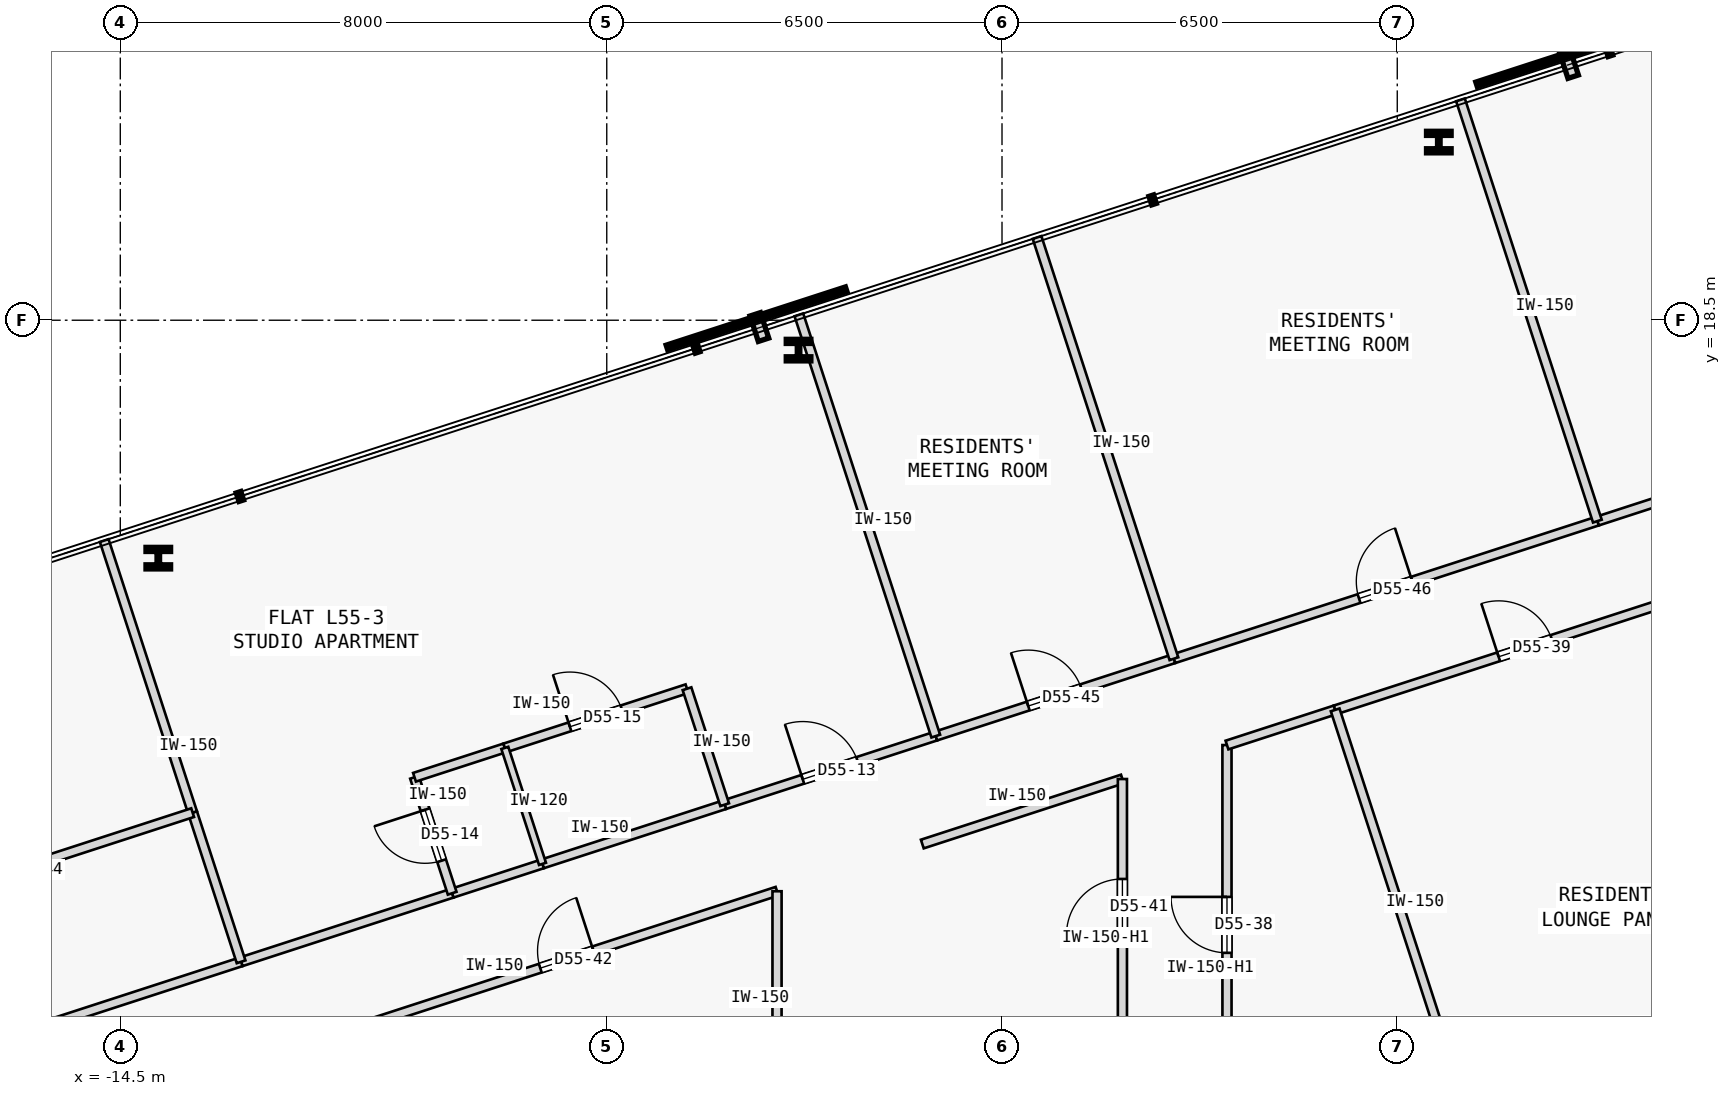
"""IFC4 building model, lengths in metres.
Left out: names, types, materials, properties, quantities, classifications, styles, units other than length and angle.
Written with IfcOpenShell. Run it as: python <this file> out.ifc"""

import sys

from ifc_helpers import new_model, si_unit, direction, frame, frame_2d, origin, origin_2d, place, context, subcontext, project, spatial, rectangle, i_section, extrude, element, fill, save


model = new_model("IFC4")
c1 = context("Model", 3, precision=1e-05, world=origin(), true_north=direction((0.0, 1.0)))
c2 = subcontext(c1, "Body", "Model", "MODEL_VIEW")
j1 = project(units=[si_unit("LENGTHUNIT", "METRE"), si_unit("PLANEANGLEUNIT", "RADIAN")], contexts=[c1])
p1 = place(None, origin())
s1 = spatial("IfcSite", under=j1, at=p1, CompositionType="ELEMENT")
p2 = place(p1, origin())
s2 = spatial("IfcBuilding", under=s1, at=p2, CompositionType="ELEMENT")
p3 = place(p2, frame((0.0, 0.0, 210.9)))
s3 = spatial("IfcBuildingStorey", under=s2, at=p3, CompositionType="ELEMENT", Elevation=210.9)
for number, where, z_axis, x_axis in (
    (1, (7.184, 21.43, 0.0), (0.0, 0.0, 1.0), (1.0, 0.0, 0.0)),
    (2, (-3.346, 18.009, 0.0), (0.0, 0.0, 1.0), (1.0, 0.0, 0.0)),
    (3, (-13.875, 14.587, 0.0), (0.0, 0.0, 1.0), (1.0, 0.0, 0.0)),
):
    element("IfcColumn", number, at=place(p3, frame(where, z_axis=z_axis, x_axis=x_axis)), inside=s3, PredefinedType="COLUMN", context=c2, shape_type="SweptSolid", body=[
        extrude(i_section(OverallWidth=0.405, OverallDepth=0.355, WebThickness=0.042, FlangeThickness=0.068, FilletRadius=0.015, at=origin_2d()), origin(), (0.0, 0.0, 1.0), 3.35),
    ])
p4 = place(p3, frame((-12.513, 7.949, 0.0), z_axis=(0.0, 0.0, 1.0), x_axis=(0.951050780541, 0.309034646652, 0.0)))
e4 = element("IfcWall", 4, at=p4, inside=s3, PredefinedType="PARTITIONING", context=c2, shape_type="SweptSolid", body=[
    extrude(rectangle(XDim=3.65, YDim=0.15, at=frame_2d((1.825, 0.0))), origin(), (0.0, 0.0, 1.0), 3.125),
])
p5 = place(p3, frame((-4.561, 10.533, 0.0), z_axis=(0.0, 0.0, 1.0), x_axis=(0.951057168147, 0.309014988174, 0.0)))
e5 = element("IfcWall", 5, at=p5, inside=s3, PredefinedType="PARTITIONING", context=c2, shape_type="SweptSolid", body=[
    extrude(rectangle(XDim=3.65, YDim=0.15, at=frame_2d((1.825, 0.0))), origin(), (0.0, 0.0, 1.0), 3.125),
])
p6 = place(p5, frame((1.35, 0.0, 0.0)))
e6 = element("IfcOpeningElement", 6, at=p6, cuts=e5, PredefinedType="OPENING", context=c2, shape_type="SweptSolid", body=[
    extrude(rectangle(XDim=0.95, YDim=2.15, at=frame_2d((0.475, 1.075))), frame((0.0, 0.085, 0.0), z_axis=(0.0, -1.0, 0.0), x_axis=(1.0, 0.0, 0.0)), (0.0, 0.0, 1.0), 0.17),
])
p7 = place(p3, frame((-9.042, 9.077, 0.0), z_axis=(0.0, 0.0, 1.0), x_axis=(0.951062779317, 0.308997718112, 0.0)))
e7 = element("IfcWall", 7, at=p7, inside=s3, PredefinedType="PARTITIONING", context=c2, shape_type="SweptSolid", body=[
    extrude(rectangle(XDim=1.562, YDim=0.15, at=frame_2d((0.781, 0.0))), origin(), (0.0, 0.0, 1.0), 3.125),
])
p8 = place(p3, frame((-7.557, 9.56, 0.0), z_axis=(0.0, 0.0, 1.0), x_axis=(0.951058557014, 0.309010713619, 0.0)))
e8 = element("IfcWall", 8, at=p8, inside=s3, PredefinedType="PARTITIONING", context=c2, shape_type="SweptSolid", body=[
    extrude(rectangle(XDim=3.15, YDim=0.15, at=frame_2d((1.575, 0.0))), origin(), (0.0, 0.0, 1.0), 3.125),
])
p9 = place(p3, frame((9.791, 15.196, 0.0), z_axis=(0.0, 0.0, 1.0), x_axis=(0.951050780541, 0.309034646652, 0.0)))
e9 = element("IfcWall", 9, at=p9, inside=s3, PredefinedType="PARTITIONING", context=c2, shape_type="SweptSolid", body=[
    extrude(rectangle(XDim=3.65, YDim=0.15, at=frame_2d((1.825, 0.0))), origin(), (0.0, 0.0, 1.0), 3.125),
])
p10 = place(p3, frame((3.7, 5.6, 0.0), z_axis=(0.0, 0.0, 1.0), x_axis=(-0.000123839008, 0.999999992332, 0.0)))
e10 = element("IfcWall", 10, at=p10, inside=s3, PredefinedType="PARTITIONING", context=c2, shape_type="SweptSolid", body=[
    extrude(rectangle(XDim=5.914, YDim=0.15, at=frame_2d((2.957, 0.0))), origin(), (0.0, 0.0, 1.0), 2.675),
])
p11 = place(p10, frame((2.497, 0.0, 0.0)))
e11 = element("IfcOpeningElement", 11, at=p11, cuts=e10, PredefinedType="OPENING", context=c2, shape_type="SweptSolid", body=[
    extrude(rectangle(XDim=0.92, YDim=2.15, at=frame_2d((0.46, 1.075))), frame((0.0, 0.085, 0.0), z_axis=(0.0, -1.0, 0.0), x_axis=(1.0, 0.0, 0.0)), (0.0, 0.0, 1.0), 0.17),
])
p12 = place(p3, frame((3.699, 11.514, 0.0), z_axis=(0.0, 0.0, 1.0), x_axis=(0.951069540665, 0.308976906612, 0.0)))
e12 = element("IfcWall", 12, at=p12, inside=s3, PredefinedType="PARTITIONING", context=c2, shape_type="SweptSolid", body=[
    extrude(rectangle(XDim=1.871, YDim=0.15, at=frame_2d((0.936, 0.0))), origin(), (0.0, 0.0, 1.0), 3.125),
])
p13 = place(p3, frame((5.479, 12.092, 0.0), z_axis=(0.0, 0.0, 1.0), x_axis=(0.951051809397, 0.309031480343, 0.0)))
e13 = element("IfcWall", 13, at=p13, inside=s3, PredefinedType="PARTITIONING", context=c2, shape_type="SweptSolid", body=[
    extrude(rectangle(XDim=6.573, YDim=0.15, at=frame_2d((3.287, 0.0))), origin(), (0.0, 0.0, 1.0), 3.125),
])
p14 = place(p13, frame((2.826, 0.0, 0.0)))
e14 = element("IfcOpeningElement", 14, at=p14, cuts=e13, PredefinedType="OPENING", context=c2, shape_type="SweptSolid", body=[
    extrude(rectangle(XDim=0.92, YDim=2.15, at=frame_2d((0.46, 1.075))), frame((0.0, 0.085, 0.0), z_axis=(0.0, -1.0, 0.0), x_axis=(1.0, 0.0, 0.0)), (0.0, 0.0, 1.0), 0.17),
])
p15 = place(p3, frame((-1.311, 9.886, 0.0), z_axis=(0.0, 0.0, 1.0), x_axis=(0.951068803905, 0.308979174442, 0.0)))
e15 = element("IfcWall", 15, at=p15, inside=s3, PredefinedType="PARTITIONING", context=c2, shape_type="SweptSolid", body=[
    extrude(rectangle(XDim=3.46, YDim=0.15, at=frame_2d((1.73, 0.0))), origin(), (0.0, 0.0, 1.0), 3.125),
])
p16 = place(p3, frame((1.98, 6.748, 0.0), z_axis=(0.0, 0.0, 1.0), x_axis=(0.0, 1.0, 0.0)))
e16 = element("IfcWall", 16, at=p16, inside=s3, PredefinedType="PARTITIONING", context=c2, shape_type="SweptSolid", body=[
    extrude(rectangle(XDim=4.207, YDim=0.15, at=frame_2d((2.104, 0.0))), origin(), (0.0, 0.0, 1.0), 2.675),
])
p17 = place(p16, frame((1.643, 0.0, 0.0)))
e17 = element("IfcOpeningElement", 17, at=p17, cuts=e16, PredefinedType="OPENING", context=c2, shape_type="SweptSolid", body=[
    extrude(rectangle(XDim=0.92, YDim=2.15, at=frame_2d((0.46, 1.075))), frame((0.0, 0.085, 0.0), z_axis=(0.0, -1.0, 0.0), x_axis=(1.0, 0.0, 0.0)), (0.0, 0.0, 1.0), 0.17),
])
p18 = place(p3, frame((-10.612, 6.864, 0.0), z_axis=(0.0, 0.0, 1.0), x_axis=(0.951060972078, 0.309003280548, 0.0)))
e18 = element("IfcWall", 18, at=p18, inside=s3, PredefinedType="PARTITIONING", context=c2, shape_type="SweptSolid", body=[
    extrude(rectangle(XDim=7.268, YDim=0.15, at=frame_2d((3.634, 0.0))), origin(), (0.0, 0.0, 1.0), 3.125),
])
p19 = place(p18, frame((3.174, 0.0, 0.0)))
e19 = element("IfcOpeningElement", 19, at=p19, cuts=e18, PredefinedType="OPENING", context=c2, shape_type="SweptSolid", body=[
    extrude(rectangle(XDim=0.92, YDim=2.15, at=frame_2d((0.46, 1.075))), frame((0.0, 0.085, 0.0), z_axis=(0.0, -1.0, 0.0), x_axis=(1.0, 0.0, 0.0)), (0.0, 0.0, 1.0), 0.17),
])
p20 = place(p3, frame((-3.7, 5.6, 0.0), z_axis=(0.0, 0.0, 1.0), x_axis=(0.000139120755, 0.999999990323, 0.0)))
e20 = element("IfcWall", 20, at=p20, inside=s3, PredefinedType="PARTITIONING", context=c2, shape_type="SweptSolid", body=[
    extrude(rectangle(XDim=3.51, YDim=0.15, at=frame_2d((1.755, 0.0))), origin(), (0.0, 0.0, 1.0), 3.125),
])
p21 = place(p3, frame((-18.292, 6.072, 0.0), z_axis=(0.0, 0.0, 1.0), x_axis=(0.951062707515, 0.30899793911, 0.0)))
e21 = element("IfcWall", 21, at=p21, inside=s3, PredefinedType="PARTITIONING", context=c2, shape_type="SweptSolid", body=[
    extrude(rectangle(XDim=6.076, YDim=0.15, at=frame_2d((3.038, 0.0))), origin(), (0.0, 0.0, 1.0), 3.125),
])
p22 = place(p21, frame((0.877, 0.0, 0.0)))
e22 = element("IfcOpeningElement", 22, at=p22, cuts=e21, PredefinedType="OPENING", context=c2, shape_type="SweptSolid", body=[
    extrude(rectangle(XDim=0.92, YDim=2.15, at=frame_2d((0.46, 1.075))), frame((0.0, 0.085, 0.0), z_axis=(0.0, -1.0, 0.0), x_axis=(1.0, 0.0, 0.0)), (0.0, 0.0, 1.0), 0.17),
])
p23 = place(p3, frame((-1.089, 11.661, 0.0), z_axis=(0.0, 0.0, 1.0), x_axis=(0.951057158344, 0.309015018346, 0.0)))
e23 = element("IfcWall", 23, at=p23, inside=s3, PredefinedType="PARTITIONING", context=c2, shape_type="SweptSolid", body=[
    extrude(rectangle(XDim=4.118, YDim=0.15, at=frame_2d((2.059, 0.0))), origin(), (0.0, 0.0, 1.0), 3.125),
])
p24 = place(p23, frame((1.599, 0.0, 0.0)))
e24 = element("IfcOpeningElement", 24, at=p24, cuts=e23, PredefinedType="OPENING", context=c2, shape_type="SweptSolid", body=[
    extrude(rectangle(XDim=0.92, YDim=2.15, at=frame_2d((0.46, 1.075))), frame((0.0, 0.085, 0.0), z_axis=(0.0, -1.0, 0.0), x_axis=(1.0, 0.0, 0.0)), (0.0, 0.0, 1.0), 0.17),
])
p25 = place(p3, frame((2.827, 12.934, 0.0), z_axis=(0.0, 0.0, 1.0), x_axis=(0.951056608557, 0.309016710423, 0.0)))
e25 = element("IfcWall", 25, at=p25, inside=s3, PredefinedType="PARTITIONING", context=c2, shape_type="SweptSolid", body=[
    extrude(rectangle(XDim=7.322, YDim=0.15, at=frame_2d((3.661, 0.0))), origin(), (0.0, 0.0, 1.0), 3.125),
])
p26 = place(p25, frame((3.201, 0.0, 0.0)))
e26 = element("IfcOpeningElement", 26, at=p26, cuts=e25, PredefinedType="OPENING", context=c2, shape_type="SweptSolid", body=[
    extrude(rectangle(XDim=0.92, YDim=2.15, at=frame_2d((0.46, 1.075))), frame((0.0, 0.085, 0.0), z_axis=(0.0, -1.0, 0.0), x_axis=(1.0, 0.0, 0.0)), (0.0, 0.0, 1.0), 0.17),
])
p27 = place(p3, frame((-9.042, 9.077, 0.0), z_axis=(0.0, 0.0, 1.0), x_axis=(-0.308912611775, 0.951090425925, 0.0)))
e27 = element("IfcWall", 27, at=p27, inside=s3, PredefinedType="PARTITIONING", context=c2, shape_type="SweptSolid", body=[
    extrude(rectangle(XDim=2.005, YDim=0.15, at=frame_2d((1.002, 0.0))), origin(), (0.0, 0.0, 1.0), 3.125),
])
p28 = place(p27, frame((0.562, 0.0, 0.0)))
e28 = element("IfcOpeningElement", 28, at=p28, cuts=e27, PredefinedType="OPENING", context=c2, shape_type="SweptSolid", body=[
    extrude(rectangle(XDim=0.88, YDim=2.15, at=frame_2d((0.44, 1.075))), frame((0.0, 0.085, 0.0), z_axis=(0.0, -1.0, 0.0), x_axis=(1.0, 0.0, 0.0)), (0.0, 0.0, 1.0), 0.17),
])
p29 = place(p3, frame((-9.662, 10.984, 0.0), z_axis=(0.0, 0.0, 1.0), x_axis=(0.951047852885, 0.309043656337, 0.0)))
e29 = element("IfcWall", 29, at=p29, inside=s3, PredefinedType="PARTITIONING", context=c2, shape_type="SweptSolid", body=[
    extrude(rectangle(XDim=1.562, YDim=0.15, at=frame_2d((0.781, 0.0))), origin(), (0.0, 0.0, 1.0), 3.125),
])
p30 = place(p3, frame((-8.176, 11.467, 0.0), z_axis=(0.0, 0.0, 1.0), x_axis=(0.951058557014, 0.309010713619, 0.0)))
e30 = element("IfcWall", 30, at=p30, inside=s3, PredefinedType="PARTITIONING", context=c2, shape_type="SweptSolid", body=[
    extrude(rectangle(XDim=3.15, YDim=0.15, at=frame_2d((1.575, 0.0))), origin(), (0.0, 0.0, 1.0), 3.125),
])
p31 = place(p30, frame((1.125, 0.0, 0.0)))
e31 = element("IfcOpeningElement", 31, at=p31, cuts=e30, PredefinedType="OPENING", context=c2, shape_type="SweptSolid", body=[
    extrude(rectangle(XDim=0.9, YDim=2.15, at=frame_2d((0.45, 1.075))), frame((0.0, 0.085, 0.0), z_axis=(0.0, -1.0, 0.0), x_axis=(1.0, 0.0, 0.0)), (0.0, 0.0, 1.0), 0.17),
])
p32 = place(p3, frame((-4.561, 10.533, 0.0), z_axis=(0.0, 0.0, 1.0), x_axis=(-0.309022749039, 0.951054646472, 0.0)))
e32 = element("IfcWall", 32, at=p32, inside=s3, PredefinedType="PARTITIONING", context=c2, shape_type="SweptSolid", body=[
    extrude(rectangle(XDim=2.005, YDim=0.15, at=frame_2d((1.002, 0.0))), origin(), (0.0, 0.0, 1.0), 3.125),
])
p33 = place(p3, frame((-12.513, 7.949, 0.0), z_axis=(0.0, 0.0, 1.0), x_axis=(-0.309062527822, 0.951041720376, 0.0)))
e33 = element("IfcWall", 33, at=p33, inside=s3, PredefinedType="PARTITIONING", context=c2, shape_type="SweptSolid", body=[
    extrude(rectangle(XDim=2.579, YDim=0.15, at=frame_2d((1.29, 0.0))), origin(), (0.0, 0.0, 1.0), 3.125),
])
p34 = place(p3, frame((-13.311, 10.402, 0.0), z_axis=(0.0, 0.0, 1.0), x_axis=(-0.309010977541, 0.951058471262, 0.0)))
e34 = element("IfcWall", 34, at=p34, inside=s3, PredefinedType="PARTITIONING", context=c2, shape_type="SweptSolid", body=[
    extrude(rectangle(XDim=4.705, YDim=0.15, at=frame_2d((2.353, 0.0))), origin(), (0.0, 0.0, 1.0), 3.125),
])
p35 = place(p3, frame((-1.089, 11.661, 0.0), z_axis=(0.0, 0.0, 1.0), x_axis=(-0.309029230739, 0.951052540372, 0.0)))
e35 = element("IfcWall", 35, at=p35, inside=s3, PredefinedType="PARTITIONING", context=c2, shape_type="SweptSolid", body=[
    extrude(rectangle(XDim=7.284, YDim=0.15, at=frame_2d((3.642, 0.0))), origin(), (0.0, 0.0, 1.0), 3.125),
])
p36 = place(p3, frame((-7.557, 9.56, 0.0), z_axis=(0.0, 0.0, 1.0), x_axis=(-0.309022749039, 0.951054646472, 0.0)))
e36 = element("IfcWall", 36, at=p36, inside=s3, PredefinedType="PARTITIONING", context=c2, shape_type="SweptSolid", body=[
    extrude(rectangle(XDim=2.005, YDim=0.12, at=frame_2d((1.002, 0.0))), origin(), (0.0, 0.0, 1.0), 3.125),
])
p37 = place(p3, frame((9.791, 15.196, 0.0), z_axis=(0.0, 0.0, 1.0), x_axis=(-0.309029230739, 0.951052540372, 0.0)))
e37 = element("IfcWall", 37, at=p37, inside=s3, PredefinedType="PARTITIONING", context=c2, shape_type="SweptSolid", body=[
    extrude(rectangle(XDim=7.284, YDim=0.15, at=frame_2d((3.642, 0.0))), origin(), (0.0, 0.0, 1.0), 3.125),
])
p38 = place(p3, frame((7.588, 5.6, 0.0), z_axis=(0.0, 0.0, 1.0), x_axis=(-0.309018946982, 0.951055881852, 0.0)))
e38 = element("IfcWall", 38, at=p38, inside=s3, PredefinedType="PARTITIONING", context=c2, shape_type="SweptSolid", body=[
    extrude(rectangle(XDim=6.826, YDim=0.15, at=frame_2d((3.413, 0.0))), origin(), (0.0, 0.0, 1.0), 3.125),
])
p39 = place(p3, frame((-19.089, 8.524, 0.0), z_axis=(0.0, 0.0, 1.0), x_axis=(0.951050898488, 0.309034283674, 0.0)))
e39 = element("IfcWall", 39, at=p39, inside=s3, PredefinedType="PARTITIONING", context=c2, shape_type="SweptSolid", body=[
    extrude(rectangle(XDim=6.076, YDim=0.15, at=frame_2d((3.038, 0.0))), origin(), (0.0, 0.0, 1.0), 3.125),
])
p40 = place(p39, frame((2.578, 0.0, 0.0)))
e40 = element("IfcOpeningElement", 40, at=p40, cuts=e39, PredefinedType="OPENING", context=c2, shape_type="SweptSolid", body=[
    extrude(rectangle(XDim=0.92, YDim=2.15, at=frame_2d((0.46, 1.075))), frame((0.0, 0.085, 0.0), z_axis=(0.0, -1.0, 0.0), x_axis=(1.0, 0.0, 0.0)), (0.0, 0.0, 1.0), 0.17),
])
p41 = place(p3, frame((2.827, 12.934, 0.0), z_axis=(0.0, 0.0, 1.0), x_axis=(-0.308998913866, 0.951062390819, 0.0)))
e41 = element("IfcWall", 41, at=p41, inside=s3, PredefinedType="PARTITIONING", context=c2, shape_type="SweptSolid", body=[
    extrude(rectangle(XDim=7.284, YDim=0.15, at=frame_2d((3.642, 0.0))), origin(), (0.0, 0.0, 1.0), 3.125),
])
p42 = place(p6, origin())
e42 = element("IfcDoor", 42, at=p42, inside=s3, OperationType="SINGLE_SWING_LEFT", PredefinedType="DOOR", context=c2, shape_type="SweptSolid", body=[
    extrude(rectangle(XDim=0.95, YDim=2.15, at=frame_2d((0.475, 1.075))), frame((0.0, 0.025, 0.0), z_axis=(0.0, -1.0, 0.0), x_axis=(1.0, 0.0, 0.0)), (0.0, 0.0, 1.0), 0.05),
])
fill(e6, e42)
p43 = place(p28, origin())
e43 = element("IfcDoor", 43, at=p43, inside=s3, OperationType="SINGLE_SWING_RIGHT", PredefinedType="DOOR", context=c2, shape_type="SweptSolid", body=[
    extrude(rectangle(XDim=0.88, YDim=2.15, at=frame_2d((0.44, 1.075))), frame((0.0, 0.025, 0.0), z_axis=(0.0, -1.0, 0.0), x_axis=(1.0, 0.0, 0.0)), (0.0, 0.0, 1.0), 0.05),
])
fill(e28, e43)
p44 = place(p31, origin())
e44 = element("IfcDoor", 44, at=p44, inside=s3, OperationType="SINGLE_SWING_LEFT", PredefinedType="DOOR", context=c2, shape_type="SweptSolid", body=[
    extrude(rectangle(XDim=0.9, YDim=2.15, at=frame_2d((0.45, 1.075))), frame((0.0, 0.025, 0.0), z_axis=(0.0, -1.0, 0.0), x_axis=(1.0, 0.0, 0.0)), (0.0, 0.0, 1.0), 0.05),
])
fill(e31, e44)
p45 = place(p11, origin())
e45 = element("IfcDoor", 45, at=p45, inside=s3, OperationType="SINGLE_SWING_RIGHT", PredefinedType="DOOR", context=c2, shape_type="SweptSolid", body=[
    extrude(rectangle(XDim=0.92, YDim=2.15, at=frame_2d((0.46, 1.075))), frame((0.0, 0.025, 0.0), z_axis=(0.0, -1.0, 0.0), x_axis=(1.0, 0.0, 0.0)), (0.0, 0.0, 1.0), 0.05),
])
fill(e11, e45)
p46 = place(p14, origin())
e46 = element("IfcDoor", 46, at=p46, inside=s3, OperationType="SINGLE_SWING_LEFT", PredefinedType="DOOR", context=c2, shape_type="SweptSolid", body=[
    extrude(rectangle(XDim=0.92, YDim=2.15, at=frame_2d((0.46, 1.075))), frame((0.0, 0.025, 0.0), z_axis=(0.0, -1.0, 0.0), x_axis=(1.0, 0.0, 0.0)), (0.0, 0.0, 1.0), 0.05),
])
fill(e14, e46)
p47 = place(p17, origin())
e47 = element("IfcDoor", 47, at=p47, inside=s3, OperationType="SINGLE_SWING_LEFT", PredefinedType="DOOR", context=c2, shape_type="SweptSolid", body=[
    extrude(rectangle(XDim=0.92, YDim=2.15, at=frame_2d((0.46, 1.075))), frame((0.0, 0.025, 0.0), z_axis=(0.0, -1.0, 0.0), x_axis=(1.0, 0.0, 0.0)), (0.0, 0.0, 1.0), 0.05),
])
fill(e17, e47)
p48 = place(p19, origin())
e48 = element("IfcDoor", 48, at=p48, inside=s3, OperationType="SINGLE_SWING_RIGHT", PredefinedType="DOOR", context=c2, shape_type="SweptSolid", body=[
    extrude(rectangle(XDim=0.92, YDim=2.15, at=frame_2d((0.46, 1.075))), frame((0.0, 0.025, 0.0), z_axis=(0.0, -1.0, 0.0), x_axis=(1.0, 0.0, 0.0)), (0.0, 0.0, 1.0), 0.05),
])
fill(e19, e48)
p49 = place(p24, origin())
e49 = element("IfcDoor", 49, at=p49, inside=s3, OperationType="SINGLE_SWING_LEFT", PredefinedType="DOOR", context=c2, shape_type="SweptSolid", body=[
    extrude(rectangle(XDim=0.92, YDim=2.15, at=frame_2d((0.46, 1.075))), frame((0.0, 0.025, 0.0), z_axis=(0.0, -1.0, 0.0), x_axis=(1.0, 0.0, 0.0)), (0.0, 0.0, 1.0), 0.05),
])
fill(e24, e49)
p50 = place(p26, origin())
e50 = element("IfcDoor", 50, at=p50, inside=s3, OperationType="SINGLE_SWING_RIGHT", PredefinedType="DOOR", context=c2, shape_type="SweptSolid", body=[
    extrude(rectangle(XDim=0.92, YDim=2.15, at=frame_2d((0.46, 1.075))), frame((0.0, 0.025, 0.0), z_axis=(0.0, -1.0, 0.0), x_axis=(1.0, 0.0, 0.0)), (0.0, 0.0, 1.0), 0.05),
])
fill(e26, e50)
save(model, sys.argv[1])
